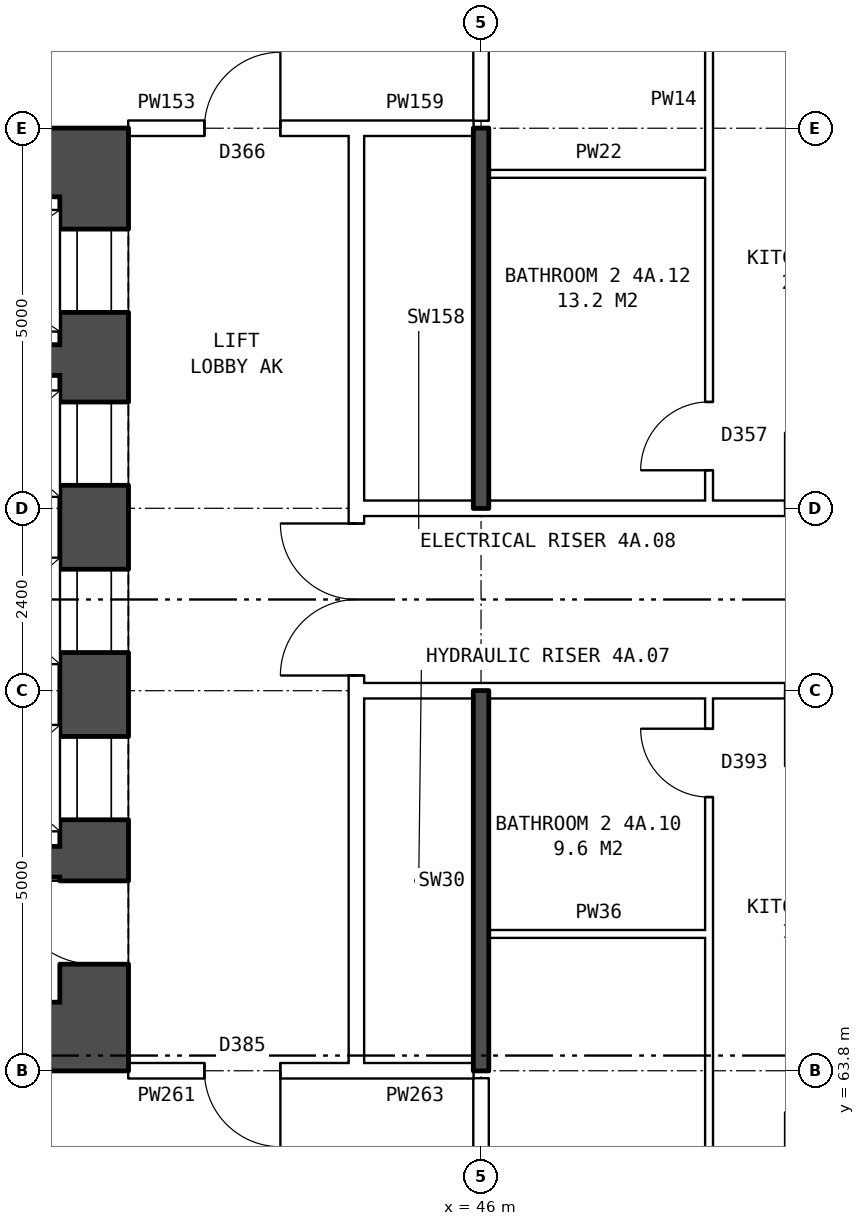
"""IFC4 building model, lengths in metres.
Left out: names, types, materials, properties, quantities, classifications, styles, units other than length and angle.
Written with IfcOpenShell. Run it as: python <this file> out.ifc"""

import sys

from ifc_helpers import new_model, si_unit, direction, frame, frame_2d, origin, place, context, subcontext, project, spatial, rectangle, extrude, element, fill, save


model = new_model("IFC4")
c1 = context("Model", 3, precision=1e-05, world=origin(), true_north=direction((0.0, 1.0)))
c2 = subcontext(c1, "Body", "Model", "MODEL_VIEW")
j1 = project(units=[si_unit("LENGTHUNIT", "METRE"), si_unit("PLANEANGLEUNIT", "RADIAN")], contexts=[c1])
p1 = place(None, origin())
s1 = spatial("IfcSite", under=j1, at=p1, CompositionType="ELEMENT")
p2 = place(p1, origin())
s2 = spatial("IfcBuilding", under=s1, at=p2, CompositionType="ELEMENT")
p3 = place(p2, frame((0.0, 0.0, 19.5)))
s3 = spatial("IfcBuildingStorey", under=s2, at=p3, CompositionType="ELEMENT", Elevation=19.5)
p4 = place(p3, frame((40.91, 75.3, 0.0), z_axis=(0.0, 0.0, 1.0), x_axis=(0.0, -1.0, 0.0)))
e1 = element("IfcWall", 1, at=p4, inside=s3, PredefinedType="SHEAR", context=c2, shape_type="SweptSolid", body=[
    extrude(rectangle(XDim=10.6, YDim=0.9, at=frame_2d((5.3, 0.0))), origin(), (0.0, 0.0, 1.0), 2.85),
])
p5 = place(p4, frame((0.425, 0.0, 0.0)))
e2 = element("IfcOpeningElement", 2, at=p5, cuts=e1, PredefinedType="OPENING", context=c2, shape_type="SweptSolid", body=[
    extrude(rectangle(XDim=1.1, YDim=2.1, at=frame_2d((0.55, 1.05))), frame((0.0, 0.46, 0.0), z_axis=(0.0, -1.0, 0.0), x_axis=(1.0, 0.0, 0.0)), (0.0, 0.0, 1.0), 0.92),
])
p6 = place(p4, frame((2.7, 0.0, 0.0)))
e3 = element("IfcOpeningElement", 3, at=p6, cuts=e1, PredefinedType="OPENING", context=c2, shape_type="SweptSolid", body=[
    extrude(rectangle(XDim=1.1, YDim=2.1, at=frame_2d((0.55, 1.05))), frame((0.0, 0.46, 0.0), z_axis=(0.0, -1.0, 0.0), x_axis=(1.0, 0.0, 0.0)), (0.0, 0.0, 1.0), 0.92),
])
p7 = place(p4, frame((4.9, 0.0, 0.0)))
e4 = element("IfcOpeningElement", 4, at=p7, cuts=e1, PredefinedType="OPENING", context=c2, shape_type="SweptSolid", body=[
    extrude(rectangle(XDim=1.1, YDim=2.1, at=frame_2d((0.55, 1.05))), frame((0.0, 0.46, 0.0), z_axis=(0.0, -1.0, 0.0), x_axis=(1.0, 0.0, 0.0)), (0.0, 0.0, 1.0), 0.92),
])
p8 = place(p4, frame((7.1, 0.0, 0.0)))
e5 = element("IfcOpeningElement", 5, at=p8, cuts=e1, PredefinedType="OPENING", context=c2, shape_type="SweptSolid", body=[
    extrude(rectangle(XDim=1.1, YDim=2.1, at=frame_2d((0.55, 1.05))), frame((0.0, 0.46, 0.0), z_axis=(0.0, -1.0, 0.0), x_axis=(1.0, 0.0, 0.0)), (0.0, 0.0, 1.0), 0.92),
])
p9 = place(p4, frame((9.0, 0.0, 0.0)))
e6 = element("IfcOpeningElement", 6, at=p9, cuts=e1, PredefinedType="OPENING", context=c2, shape_type="SweptSolid", body=[
    extrude(rectangle(XDim=1.1, YDim=2.1, at=frame_2d((0.55, 1.05))), frame((0.0, 0.46, 0.0), z_axis=(0.0, -1.0, 0.0), x_axis=(1.0, 0.0, 0.0)), (0.0, 0.0, 1.0), 0.92),
])
for number, where, z_axis, x_axis in (
    (7, (41.36, 75.75, 0.0), (0.0, 0.0, 1.0), (-1.0, 0.0, 0.0)),
    (8, (41.36, 64.25, 0.0), (0.0, 0.0, 1.0), (-1.0, 0.0, 0.0)),
):
    element("IfcWall", number, at=place(p3, frame(where, z_axis=z_axis, x_axis=x_axis)), inside=s3, PredefinedType="SHEAR", context=c2, shape_type="SweptSolid", body=[
        extrude(rectangle(XDim=9.0, YDim=0.9, at=frame_2d((4.5, 0.0))), origin(), (0.0, 0.0, 1.0), 2.85),
    ])
p10 = place(p3, frame((40.46, 73.15, 0.0), z_axis=(0.0, 0.0, 1.0), x_axis=(-1.0, 0.0, 0.0)))
e9 = element("IfcWall", 9, at=p10, inside=s3, PredefinedType="SHEAR", context=c2, shape_type="SweptSolid", body=[
    extrude(rectangle(XDim=3.17, YDim=0.4, at=frame_2d((1.585, 0.0))), origin(), (0.0, 0.0, 1.0), 2.85),
])
p11 = place(p3, frame((40.46, 66.55, 0.0), z_axis=(0.0, 0.0, 1.0), x_axis=(-1.0, 0.0, 0.0)))
e10 = element("IfcWall", 10, at=p11, inside=s3, PredefinedType="SHEAR", context=c2, shape_type="SweptSolid", body=[
    extrude(rectangle(XDim=1.95, YDim=0.4, at=frame_2d((0.975, 0.0))), origin(), (0.0, 0.0, 1.0), 2.85),
])
p12 = place(p3, frame((44.36, 63.9, 0.0), z_axis=(0.0, 0.0, 1.0), x_axis=(0.0, 1.0, 0.0)))
e11 = element("IfcWall", 11, at=p12, inside=s3, PredefinedType="PARTITIONING", context=c2, shape_type="SweptSolid", body=[
    extrude(rectangle(XDim=12.2, YDim=0.2, at=frame_2d((6.1, 0.0))), origin(), (0.0, 0.0, 1.0), 2.85),
])
p13 = place(p12, frame((5.1, 0.0, 0.0)))
e12 = element("IfcOpeningElement", 12, at=p13, cuts=e11, PredefinedType="OPENING", context=c2, shape_type="SweptSolid", body=[
    extrude(rectangle(XDim=2.0, YDim=2.1, at=frame_2d((1.0, 1.05))), frame((0.0, 0.11, 0.0), z_axis=(0.0, -1.0, 0.0), x_axis=(1.0, 0.0, 0.0)), (0.0, 0.0, 1.0), 0.22),
])
p14 = place(p3, frame((41.36, 63.8, 0.0), z_axis=(0.0, 0.0, 1.0), x_axis=(1.0, 0.0, 0.0)))
e13 = element("IfcWall", 13, at=p14, inside=s3, PredefinedType="PARTITIONING", context=c2, shape_type="SweptSolid", body=[
    extrude(rectangle(XDim=3.0, YDim=0.2, at=frame_2d((1.5, 0.0))), origin(), (0.0, 0.0, 1.0), 2.85),
])
p15 = place(p14, frame((1.0, 0.0, 0.0)))
e14 = element("IfcOpeningElement", 14, at=p15, cuts=e13, PredefinedType="OPENING", context=c2, shape_type="SweptSolid", body=[
    extrude(rectangle(XDim=1.0, YDim=2.1, at=frame_2d((0.5, 1.05))), frame((0.0, 0.11, 0.0), z_axis=(0.0, -1.0, 0.0), x_axis=(1.0, 0.0, 0.0)), (0.0, 0.0, 1.0), 0.22),
])
p16 = place(p3, frame((44.36, 63.8, 0.0), z_axis=(0.0, 0.0, 1.0), x_axis=(1.0, 0.0, 0.0)))
e15 = element("IfcWall", 15, at=p16, inside=s3, PredefinedType="PARTITIONING", context=c2, shape_type="SweptSolid", body=[
    extrude(rectangle(XDim=1.54, YDim=0.2, at=frame_2d((0.77, 0.0))), origin(), (0.0, 0.0, 1.0), 2.85),
])
p17 = place(p3, frame((46.1, 65.6, 0.0), z_axis=(0.0, 0.0, 1.0), x_axis=(1.0, 0.0, 0.0)))
e16 = element("IfcWall", 16, at=p17, inside=s3, PredefinedType="PARTITIONING", context=c2, shape_type="SweptSolid", body=[
    extrude(rectangle(XDim=2.9, YDim=0.1, at=frame_2d((1.45, 0.0))), origin(), (0.0, 0.0, 1.0), 2.85),
])
p18 = place(p3, frame((44.36, 68.8, 0.0), z_axis=(0.0, 0.0, 1.0), x_axis=(1.0, 0.0, 0.0)))
e17 = element("IfcWall", 17, at=p18, inside=s3, PredefinedType="PARTITIONING", context=c2, shape_type="SweptSolid", body=[
    extrude(rectangle(XDim=19.28, YDim=0.2, at=frame_2d((9.64, 0.0))), origin(), (0.0, 0.0, 1.0), 2.85),
])
p19 = place(p18, frame((14.64, 0.0, 0.0)))
e18 = element("IfcOpeningElement", 18, at=p19, cuts=e17, PredefinedType="OPENING", context=c2, shape_type="SweptSolid", body=[
    extrude(rectangle(XDim=1.0, YDim=2.1, at=frame_2d((0.5, 1.05))), frame((0.0, 0.11, 0.0), z_axis=(0.0, -1.0, 0.0), x_axis=(1.0, 0.0, 0.0)), (0.0, 0.0, 1.0), 0.22),
])
p20 = place(p18, frame((5.64, 0.0, 0.0)))
e19 = element("IfcOpeningElement", 19, at=p20, cuts=e17, PredefinedType="OPENING", context=c2, shape_type="SweptSolid", body=[
    extrude(rectangle(XDim=1.0, YDim=2.1, at=frame_2d((0.5, 1.05))), frame((0.0, 0.11, 0.0), z_axis=(0.0, -1.0, 0.0), x_axis=(1.0, 0.0, 0.0)), (0.0, 0.0, 1.0), 0.22),
])
p21 = place(p3, frame((44.36, 71.2, 0.0), z_axis=(0.0, 0.0, 1.0), x_axis=(1.0, 0.0, 0.0)))
e20 = element("IfcWall", 20, at=p21, inside=s3, PredefinedType="PARTITIONING", context=c2, shape_type="SweptSolid", body=[
    extrude(rectangle(XDim=19.28, YDim=0.2, at=frame_2d((9.64, 0.0))), origin(), (0.0, 0.0, 1.0), 2.85),
])
p22 = place(p21, frame((14.64, 0.0, 0.0)))
e21 = element("IfcOpeningElement", 21, at=p22, cuts=e20, PredefinedType="OPENING", context=c2, shape_type="SweptSolid", body=[
    extrude(rectangle(XDim=1.0, YDim=2.1, at=frame_2d((0.5, 1.05))), frame((0.0, 0.11, 0.0), z_axis=(0.0, -1.0, 0.0), x_axis=(1.0, 0.0, 0.0)), (0.0, 0.0, 1.0), 0.22),
])
p23 = place(p21, frame((5.64, 0.0, 0.0)))
e22 = element("IfcOpeningElement", 22, at=p23, cuts=e20, PredefinedType="OPENING", context=c2, shape_type="SweptSolid", body=[
    extrude(rectangle(XDim=1.0, YDim=2.1, at=frame_2d((0.5, 1.05))), frame((0.0, 0.11, 0.0), z_axis=(0.0, -1.0, 0.0), x_axis=(1.0, 0.0, 0.0)), (0.0, 0.0, 1.0), 0.22),
])
p24 = place(p3, frame((46.1, 75.6, 0.0), z_axis=(0.0, 0.0, 1.0), x_axis=(1.0, 0.0, 0.0)))
e23 = element("IfcWall", 23, at=p24, inside=s3, PredefinedType="PARTITIONING", context=c2, shape_type="SweptSolid", body=[
    extrude(rectangle(XDim=2.9, YDim=0.1, at=frame_2d((1.45, 0.0))), origin(), (0.0, 0.0, 1.0), 2.85),
])
p25 = place(p3, frame((41.36, 76.2, 0.0), z_axis=(0.0, 0.0, 1.0), x_axis=(1.0, 0.0, 0.0)))
e24 = element("IfcWall", 24, at=p25, inside=s3, PredefinedType="PARTITIONING", context=c2, shape_type="SweptSolid", body=[
    extrude(rectangle(XDim=3.0, YDim=0.2, at=frame_2d((1.5, 0.0))), origin(), (0.0, 0.0, 1.0), 2.85),
])
p26 = place(p25, frame((1.0, 0.0, 0.0)))
e25 = element("IfcOpeningElement", 25, at=p26, cuts=e24, PredefinedType="OPENING", context=c2, shape_type="SweptSolid", body=[
    extrude(rectangle(XDim=1.0, YDim=2.1, at=frame_2d((0.5, 1.05))), frame((0.0, 0.11, 0.0), z_axis=(0.0, -1.0, 0.0), x_axis=(1.0, 0.0, 0.0)), (0.0, 0.0, 1.0), 0.22),
])
p27 = place(p3, frame((44.36, 76.2, 0.0), z_axis=(0.0, 0.0, 1.0), x_axis=(1.0, 0.0, 0.0)))
e26 = element("IfcWall", 26, at=p27, inside=s3, PredefinedType="PARTITIONING", context=c2, shape_type="SweptSolid", body=[
    extrude(rectangle(XDim=1.54, YDim=0.2, at=frame_2d((0.77, 0.0))), origin(), (0.0, 0.0, 1.0), 2.85),
])
p28 = place(p3, frame((46.0, 61.5, 0.0), z_axis=(0.0, 0.0, 1.0), x_axis=(0.0, 1.0, 0.0)))
e27 = element("IfcWall", 27, at=p28, inside=s3, PredefinedType="PARTITIONING", context=c2, shape_type="SweptSolid", body=[
    extrude(rectangle(XDim=2.2, YDim=0.2, at=frame_2d((1.1, 0.0))), origin(), (0.0, 0.0, 1.0), 2.85),
])
for number, where, z_axis, x_axis in (
    (28, (46.0, 63.8, 0.0), (0.0, 0.0, 1.0), (0.0, 1.0, 0.0)),
    (29, (46.0, 71.2, 0.0), (0.0, 0.0, 1.0), (0.0, 1.0, 0.0)),
):
    element("IfcWall", number, at=place(p3, frame(where, z_axis=z_axis, x_axis=x_axis)), inside=s3, PredefinedType="SOLIDWALL", context=c2, shape_type="SweptSolid", body=[
        extrude(rectangle(XDim=5.0, YDim=0.2, at=frame_2d((2.5, 0.0))), origin(), (0.0, 0.0, 1.0), 2.85),
    ])
p29 = place(p3, frame((46.0, 76.3, 0.0), z_axis=(0.0, 0.0, 1.0), x_axis=(0.0, 1.0, 0.0)))
e30 = element("IfcWall", 30, at=p29, inside=s3, PredefinedType="PARTITIONING", context=c2, shape_type="SweptSolid", body=[
    extrude(rectangle(XDim=2.2, YDim=0.2, at=frame_2d((1.1, 0.0))), origin(), (0.0, 0.0, 1.0), 2.85),
])
p30 = place(p3, frame((49.0, 54.36, 0.0), z_axis=(0.0, 0.0, 1.0), x_axis=(0.0, 1.0, 0.0)))
e31 = element("IfcWall", 31, at=p30, inside=s3, PredefinedType="PARTITIONING", context=c2, shape_type="SweptSolid", body=[
    extrude(rectangle(XDim=14.34, YDim=0.1, at=frame_2d((7.17, 0.0))), origin(), (0.0, 0.0, 1.0), 2.85),
])
p31 = place(p30, frame((6.7, 0.0, 0.0)))
e32 = element("IfcOpeningElement", 32, at=p31, cuts=e31, PredefinedType="OPENING", context=c2, shape_type="SweptSolid", body=[
    extrude(rectangle(XDim=0.9, YDim=2.1, at=frame_2d((0.45, 1.05))), frame((0.0, 0.06, 0.0), z_axis=(0.0, -1.0, 0.0), x_axis=(1.0, 0.0, 0.0)), (0.0, 0.0, 1.0), 0.12),
])
p32 = place(p30, frame((13.04, 0.0, 0.0)))
e33 = element("IfcOpeningElement", 33, at=p32, cuts=e31, PredefinedType="OPENING", context=c2, shape_type="SweptSolid", body=[
    extrude(rectangle(XDim=0.9, YDim=2.1, at=frame_2d((0.45, 1.05))), frame((0.0, 0.06, 0.0), z_axis=(0.0, -1.0, 0.0), x_axis=(1.0, 0.0, 0.0)), (0.0, 0.0, 1.0), 0.12),
])
p33 = place(p3, frame((49.0, 71.3, 0.0), z_axis=(0.0, 0.0, 1.0), x_axis=(0.0, 1.0, 0.0)))
e34 = element("IfcWall", 34, at=p33, inside=s3, PredefinedType="PARTITIONING", context=c2, shape_type="SweptSolid", body=[
    extrude(rectangle(XDim=14.34, YDim=0.1, at=frame_2d((7.17, 0.0))), origin(), (0.0, 0.0, 1.0), 2.85),
])
p34 = place(p33, frame((9.24, 0.0, 0.0)))
e35 = element("IfcOpeningElement", 35, at=p34, cuts=e34, PredefinedType="OPENING", context=c2, shape_type="SweptSolid", body=[
    extrude(rectangle(XDim=0.9, YDim=2.1, at=frame_2d((0.45, 1.05))), frame((0.0, 0.06, 0.0), z_axis=(0.0, -1.0, 0.0), x_axis=(1.0, 0.0, 0.0)), (0.0, 0.0, 1.0), 0.12),
])
p35 = place(p33, frame((0.4, 0.0, 0.0)))
e36 = element("IfcOpeningElement", 36, at=p35, cuts=e34, PredefinedType="OPENING", context=c2, shape_type="SweptSolid", body=[
    extrude(rectangle(XDim=0.9, YDim=2.1, at=frame_2d((0.45, 1.05))), frame((0.0, 0.06, 0.0), z_axis=(0.0, -1.0, 0.0), x_axis=(1.0, 0.0, 0.0)), (0.0, 0.0, 1.0), 0.12),
])
p36 = place(p5, origin())
e37 = element("IfcDoor", 37, at=p36, inside=s3, OperationType="DOUBLE_DOOR_SLIDING", PredefinedType="DOOR", context=c2, shape_type="SweptSolid", body=[
    extrude(rectangle(XDim=1.1, YDim=2.1, at=frame_2d((0.55, 1.05))), frame((0.0, -0.385, 0.0), z_axis=(0.0, -1.0, 0.0), x_axis=(1.0, 0.0, 0.0)), (0.0, 0.0, 1.0), 0.05),
])
fill(e2, e37)
p37 = place(p6, origin())
e38 = element("IfcDoor", 38, at=p37, inside=s3, OperationType="DOUBLE_DOOR_SLIDING", PredefinedType="DOOR", context=c2, shape_type="SweptSolid", body=[
    extrude(rectangle(XDim=1.1, YDim=2.1, at=frame_2d((0.55, 1.05))), frame((0.0, -0.385, 0.0), z_axis=(0.0, -1.0, 0.0), x_axis=(1.0, 0.0, 0.0)), (0.0, 0.0, 1.0), 0.05),
])
fill(e3, e38)
p38 = place(p7, origin())
e39 = element("IfcDoor", 39, at=p38, inside=s3, OperationType="DOUBLE_DOOR_SLIDING", PredefinedType="DOOR", context=c2, shape_type="SweptSolid", body=[
    extrude(rectangle(XDim=1.1, YDim=2.1, at=frame_2d((0.55, 1.05))), frame((0.0, -0.385, 0.0), z_axis=(0.0, -1.0, 0.0), x_axis=(1.0, 0.0, 0.0)), (0.0, 0.0, 1.0), 0.05),
])
fill(e4, e39)
p39 = place(p8, origin())
e40 = element("IfcDoor", 40, at=p39, inside=s3, OperationType="DOUBLE_DOOR_SLIDING", PredefinedType="DOOR", context=c2, shape_type="SweptSolid", body=[
    extrude(rectangle(XDim=1.1, YDim=2.1, at=frame_2d((0.55, 1.05))), frame((0.0, -0.385, 0.0), z_axis=(0.0, -1.0, 0.0), x_axis=(1.0, 0.0, 0.0)), (0.0, 0.0, 1.0), 0.05),
])
fill(e5, e40)
p40 = place(p9, frame((1.1, 0.0, 0.0), z_axis=(0.0, 0.0, 1.0), x_axis=(-1.0, 0.0, 0.0)))
e41 = element("IfcDoor", 41, at=p40, inside=s3, OperationType="SINGLE_SWING_RIGHT", PredefinedType="DOOR", context=c2, shape_type="SweptSolid", body=[
    extrude(rectangle(XDim=1.1, YDim=2.1, at=frame_2d((0.55, 1.05))), frame((0.0, 0.435, 0.0), z_axis=(0.0, -1.0, 0.0), x_axis=(1.0, 0.0, 0.0)), (0.0, 0.0, 1.0), 0.05),
])
fill(e6, e41)
p41 = place(p13, origin())
e42 = element("IfcDoor", 42, at=p41, inside=s3, OperationType="DOUBLE_DOOR_SINGLE_SWING", PredefinedType="DOOR", context=c2, shape_type="SweptSolid", body=[
    extrude(rectangle(XDim=2.0, YDim=2.1, at=frame_2d((1.0, 1.05))), frame((0.0, 0.025, 0.0), z_axis=(0.0, -1.0, 0.0), x_axis=(1.0, 0.0, 0.0)), (0.0, 0.0, 1.0), 0.05),
])
fill(e12, e42)
p42 = place(p15, frame((1.0, 0.0, 0.0), z_axis=(0.0, 0.0, 1.0), x_axis=(-1.0, 0.0, 0.0)))
e43 = element("IfcDoor", 43, at=p42, inside=s3, OperationType="SINGLE_SWING_LEFT", PredefinedType="DOOR", context=c2, shape_type="SweptSolid", body=[
    extrude(rectangle(XDim=1.0, YDim=2.1, at=frame_2d((0.5, 1.05))), frame((0.0, 0.025, 0.0), z_axis=(0.0, -1.0, 0.0), x_axis=(1.0, 0.0, 0.0)), (0.0, 0.0, 1.0), 0.05),
])
fill(e14, e43)
p43 = place(p26, origin())
e44 = element("IfcDoor", 44, at=p43, inside=s3, OperationType="SINGLE_SWING_RIGHT", PredefinedType="DOOR", context=c2, shape_type="SweptSolid", body=[
    extrude(rectangle(XDim=1.0, YDim=2.1, at=frame_2d((0.5, 1.05))), frame((0.0, 0.025, 0.0), z_axis=(0.0, -1.0, 0.0), x_axis=(1.0, 0.0, 0.0)), (0.0, 0.0, 1.0), 0.05),
])
fill(e25, e44)
p44 = place(p32, origin())
e45 = element("IfcDoor", 45, at=p44, inside=s3, OperationType="SINGLE_SWING_RIGHT", PredefinedType="DOOR", context=c2, shape_type="SweptSolid", body=[
    extrude(rectangle(XDim=0.9, YDim=2.1, at=frame_2d((0.45, 1.05))), frame((0.0, 0.025, 0.0), z_axis=(0.0, -1.0, 0.0), x_axis=(1.0, 0.0, 0.0)), (0.0, 0.0, 1.0), 0.05),
])
fill(e33, e45)
p45 = place(p35, origin())
e46 = element("IfcDoor", 46, at=p45, inside=s3, OperationType="SINGLE_SWING_LEFT", PredefinedType="DOOR", context=c2, shape_type="SweptSolid", body=[
    extrude(rectangle(XDim=0.9, YDim=2.1, at=frame_2d((0.45, 1.05))), frame((0.0, 0.025, 0.0), z_axis=(0.0, -1.0, 0.0), x_axis=(1.0, 0.0, 0.0)), (0.0, 0.0, 1.0), 0.05),
])
fill(e36, e46)
save(model, sys.argv[1])
